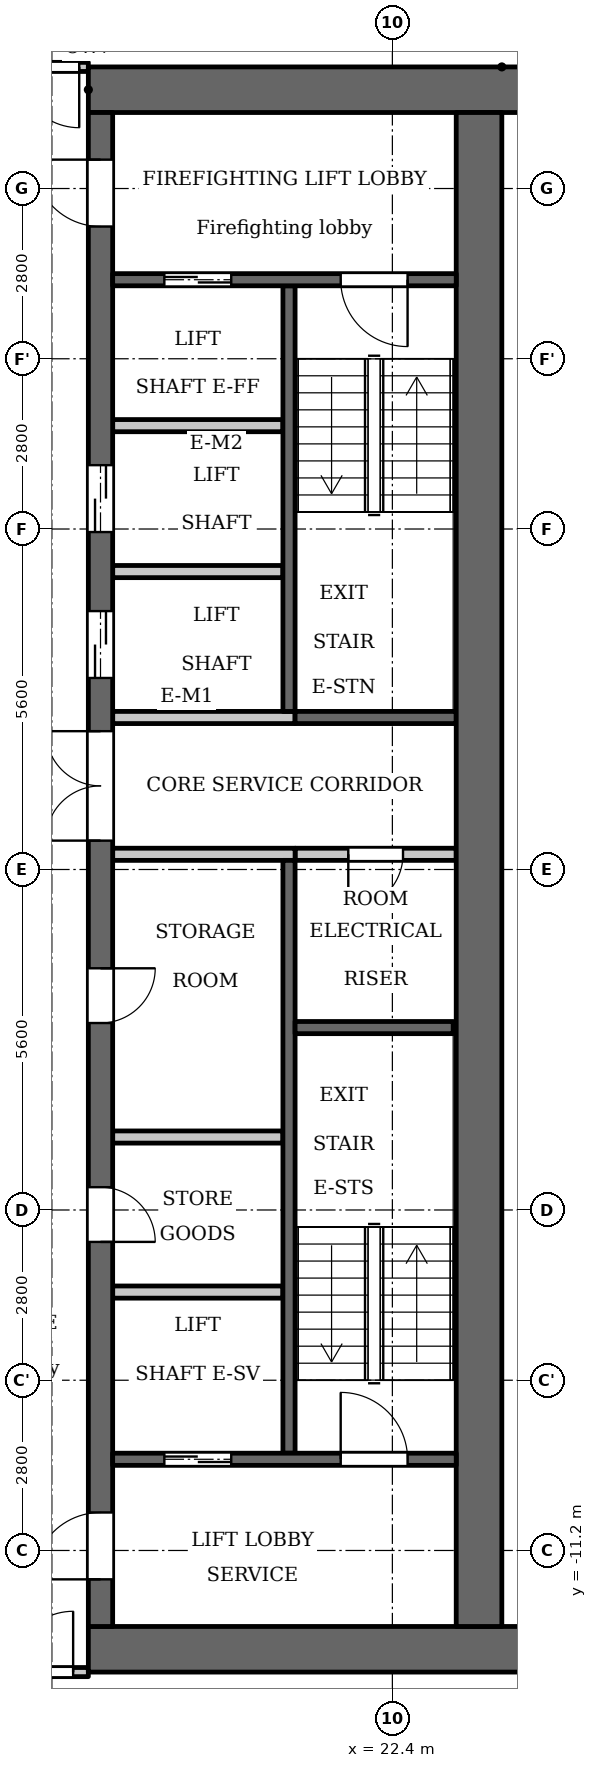
"""IFC4 building model, lengths in metres.
Left out: names, types, materials, properties, quantities, classifications, styles, units other than length and angle.
Written with IfcOpenShell. Run it as: python <this file> out.ifc"""

import sys

from ifc_helpers import new_model, si_unit, direction, frame, frame_2d, origin, place, context, subcontext, project, spatial, rectangle, extrude, element, fill, save


model = new_model("IFC4")
c1 = context("Model", 3, precision=1e-05, world=origin(), true_north=direction((0.0, 1.0)))
c2 = subcontext(c1, "Body", "Model", "MODEL_VIEW")
j1 = project(units=[si_unit("LENGTHUNIT", "METRE"), si_unit("PLANEANGLEUNIT", "RADIAN")], contexts=[c1])
p1 = place(None, origin())
s1 = spatial("IfcSite", under=j1, at=p1, CompositionType="ELEMENT")
p2 = place(p1, origin())
s2 = spatial("IfcBuilding", under=s1, at=p2, CompositionType="ELEMENT")
p3 = place(p2, frame((0.0, 0.0, 188.9)))
s3 = spatial("IfcBuildingStorey", under=s2, at=p3, CompositionType="ELEMENT", Elevation=188.9)
p4 = place(p3, frame((20.7, 2.6, 0.0), z_axis=(0.0, 0.0, 1.0), x_axis=(0.0, 1.0, 0.0)))
e1 = element("IfcWall", 1, at=p4, inside=s3, PredefinedType="SHEAR", context=c2, shape_type="SweptSolid", body=[
    extrude(rectangle(XDim=7.0, YDim=0.2, at=frame_2d((3.5, 0.0))), origin(), (0.0, 0.0, 1.0), 3.2),
])
p5 = place(p3, frame((20.7, -9.6, 0.0), z_axis=(0.0, 0.0, 1.0), x_axis=(0.0, 1.0, 0.0)))
e2 = element("IfcWall", 2, at=p5, inside=s3, PredefinedType="SHEAR", context=c2, shape_type="SweptSolid", body=[
    extrude(rectangle(XDim=9.75, YDim=0.2, at=frame_2d((4.875, 0.0))), origin(), (0.0, 0.0, 1.0), 3.2),
])
p6 = place(p3, frame((20.8, 2.5, 0.0), z_axis=(0.0, 0.0, 1.0), x_axis=(1.0, 0.0, 0.0)))
e3 = element("IfcWall", 3, at=p6, inside=s3, PredefinedType="SHEAR", context=c2, shape_type="SweptSolid", body=[
    extrude(rectangle(XDim=2.65, YDim=0.2, at=frame_2d((1.325, 0.0))), origin(), (0.0, 0.0, 1.0), 3.2),
])
p7 = place(p3, frame((20.8, 0.25, 0.0), z_axis=(0.0, 0.0, 1.0), x_axis=(1.0, 0.0, 0.0)))
e4 = element("IfcWall", 4, at=p7, inside=s3, PredefinedType="PARTITIONING", context=c2, shape_type="SweptSolid", body=[
    extrude(rectangle(XDim=2.65, YDim=0.2, at=frame_2d((1.325, 0.0))), origin(), (0.0, 0.0, 1.0), 3.2),
])
p8 = place(p7, frame((0.875, 0.0, 0.0)))
e5 = element("IfcOpeningElement", 5, at=p8, cuts=e4, PredefinedType="OPENING", context=c2, shape_type="SweptSolid", body=[
    extrude(rectangle(XDim=0.9, YDim=2.1, at=frame_2d((0.45, 1.05))), frame((0.0, 0.11, 0.0), z_axis=(0.0, -1.0, 0.0), x_axis=(1.0, 0.0, 0.0)), (0.0, 0.0, 1.0), 0.22),
])
for number, where, z_axis, x_axis in (
    (6, (17.4, 12.825, 0.0), (0.0, 0.0, 1.0), (1.0, 0.0, 0.0)),
    (7, (17.4, -12.825, 0.0), (0.0, 0.0, 1.0), (1.0, 0.0, 0.0)),
):
    element("IfcWall", number, at=place(p3, frame(where, z_axis=z_axis, x_axis=x_axis)), inside=s3, PredefinedType="SHEAR", context=c2, shape_type="SweptSolid", body=[
        extrude(rectangle(XDim=7.6, YDim=0.75, at=frame_2d((3.8, 0.0))), origin(), (0.0, 0.0, 1.0), 3.2),
    ])
p9 = place(p3, frame((17.8, -4.4, 0.0), z_axis=(0.0, 0.0, 1.0), x_axis=(1.0, 0.0, 0.0)))
e8 = element("IfcWall", 8, at=p9, inside=s3, PredefinedType="PARTITIONING", context=c2, shape_type="SweptSolid", body=[
    extrude(rectangle(XDim=2.8, YDim=0.2, at=frame_2d((1.4, 0.0))), origin(), (0.0, 0.0, 1.0), 3.2),
])
p10 = place(p3, frame((17.6, -12.45, 0.0), z_axis=(0.0, 0.0, 1.0), x_axis=(0.0, 1.0, 0.0)))
e9 = element("IfcWall", 9, at=p10, inside=s3, PredefinedType="SHEAR", context=c2, shape_type="SweptSolid", body=[
    extrude(rectangle(XDim=24.9, YDim=0.4, at=frame_2d((12.45, 0.0))), origin(), (0.0, 0.0, 1.0), 3.2),
])
p11 = place(p10, frame((6.325, 0.0, 0.0)))
e10 = element("IfcOpeningElement", 10, at=p11, cuts=e9, PredefinedType="OPENING", context=c2, shape_type="SweptSolid", body=[
    extrude(rectangle(XDim=0.9, YDim=2.1, at=frame_2d((0.45, 1.05))), frame((0.0, 0.21, 0.0), z_axis=(0.0, -1.0, 0.0), x_axis=(1.0, 0.0, 0.0)), (0.0, 0.0, 1.0), 0.42),
])
p12 = place(p10, frame((9.925, 0.0, 0.0)))
e11 = element("IfcOpeningElement", 11, at=p12, cuts=e9, PredefinedType="OPENING", context=c2, shape_type="SweptSolid", body=[
    extrude(rectangle(XDim=0.9, YDim=2.1, at=frame_2d((0.45, 1.05))), frame((0.0, 0.21, 0.0), z_axis=(0.0, -1.0, 0.0), x_axis=(1.0, 0.0, 0.0)), (0.0, 0.0, 1.0), 0.42),
])
p13 = place(p10, frame((15.6, 0.0, 0.0)))
e12 = element("IfcOpeningElement", 12, at=p13, cuts=e9, PredefinedType="OPENING", context=c2, shape_type="SweptSolid", body=[
    extrude(rectangle(XDim=1.1, YDim=2.1, at=frame_2d((0.55, 1.05))), frame((0.0, 0.21, 0.0), z_axis=(0.0, -1.0, 0.0), x_axis=(1.0, 0.0, 0.0)), (0.0, 0.0, 1.0), 0.42),
])
p14 = place(p10, frame((18.0, 0.0, 0.0)))
e13 = element("IfcOpeningElement", 13, at=p14, cuts=e9, PredefinedType="OPENING", context=c2, shape_type="SweptSolid", body=[
    extrude(rectangle(XDim=1.1, YDim=2.1, at=frame_2d((0.55, 1.05))), frame((0.0, 0.21, 0.0), z_axis=(0.0, -1.0, 0.0), x_axis=(1.0, 0.0, 0.0)), (0.0, 0.0, 1.0), 0.42),
])
p15 = place(p10, frame((23.025, 0.0, 0.0)))
e14 = element("IfcOpeningElement", 14, at=p15, cuts=e9, PredefinedType="OPENING", context=c2, shape_type="SweptSolid", body=[
    extrude(rectangle(XDim=1.1, YDim=2.1, at=frame_2d((0.55, 1.05))), frame((0.0, 0.21, 0.0), z_axis=(0.0, -1.0, 0.0), x_axis=(1.0, 0.0, 0.0)), (0.0, 0.0, 1.0), 0.42),
])
p16 = place(p10, frame((0.775, 0.0, 0.0)))
e15 = element("IfcOpeningElement", 15, at=p16, cuts=e9, PredefinedType="OPENING", context=c2, shape_type="SweptSolid", body=[
    extrude(rectangle(XDim=1.1, YDim=2.1, at=frame_2d((0.55, 1.05))), frame((0.0, 0.21, 0.0), z_axis=(0.0, -1.0, 0.0), x_axis=(1.0, 0.0, 0.0)), (0.0, 0.0, 1.0), 0.42),
])
p17 = place(p10, frame((12.925, 0.0, 0.0)))
e16 = element("IfcOpeningElement", 16, at=p17, cuts=e9, PredefinedType="OPENING", context=c2, shape_type="SweptSolid", body=[
    extrude(rectangle(XDim=1.8, YDim=2.1, at=frame_2d((0.9, 1.05))), frame((0.0, 0.21, 0.0), z_axis=(0.0, -1.0, 0.0), x_axis=(1.0, 0.0, 0.0)), (0.0, 0.0, 1.0), 0.42),
])
p18 = place(p3, frame((23.825, -12.45, 0.0), z_axis=(0.0, 0.0, 1.0), x_axis=(0.0, 1.0, 0.0)))
e17 = element("IfcWall", 17, at=p18, inside=s3, PredefinedType="SHEAR", context=c2, shape_type="SweptSolid", body=[
    extrude(rectangle(XDim=24.9, YDim=0.75, at=frame_2d((12.45, 0.0))), origin(), (0.0, 0.0, 1.0), 3.2),
])
p19 = place(p3, frame((17.8, -9.7, 0.0), z_axis=(0.0, 0.0, 1.0), x_axis=(1.0, 0.0, 0.0)))
e18 = element("IfcWall", 18, at=p19, inside=s3, PredefinedType="SHEAR", context=c2, shape_type="SweptSolid", body=[
    extrude(rectangle(XDim=5.65, YDim=0.2, at=frame_2d((2.825, 0.0))), origin(), (0.0, 0.0, 1.0), 3.2),
])
p20 = place(p19, frame((0.85, 0.0, 0.0)))
e19 = element("IfcOpeningElement", 19, at=p20, cuts=e18, PredefinedType="OPENING", context=c2, shape_type="SweptSolid", body=[
    extrude(rectangle(XDim=1.1, YDim=2.1, at=frame_2d((0.55, 1.05))), frame((0.0, 0.11, 0.0), z_axis=(0.0, -1.0, 0.0), x_axis=(1.0, 0.0, 0.0)), (0.0, 0.0, 1.0), 0.22),
])
p21 = place(p19, frame((3.75, 0.0, 0.0)))
e20 = element("IfcOpeningElement", 20, at=p21, cuts=e18, PredefinedType="OPENING", context=c2, shape_type="SweptSolid", body=[
    extrude(rectangle(XDim=1.1, YDim=2.1, at=frame_2d((0.55, 1.05))), frame((0.0, 0.11, 0.0), z_axis=(0.0, -1.0, 0.0), x_axis=(1.0, 0.0, 0.0)), (0.0, 0.0, 1.0), 0.22),
])
p22 = place(p3, frame((17.8, -6.95, 0.0), z_axis=(0.0, 0.0, 1.0), x_axis=(1.0, 0.0, 0.0)))
e21 = element("IfcWall", 21, at=p22, inside=s3, PredefinedType="PARTITIONING", context=c2, shape_type="SweptSolid", body=[
    extrude(rectangle(XDim=2.8, YDim=0.2, at=frame_2d((1.4, 0.0))), origin(), (0.0, 0.0, 1.0), 3.2),
])
for number, where, z_axis, x_axis in (
    (22, (17.8, 0.25, 0.0), (0.0, 0.0, 1.0), (1.0, 0.0, 0.0)),
    (23, (17.8, 2.5, 0.0), (0.0, 0.0, 1.0), (1.0, 0.0, 0.0)),
):
    element("IfcWall", number, at=place(p3, frame(where, z_axis=z_axis, x_axis=x_axis)), inside=s3, PredefinedType="PARTITIONING", context=c2, shape_type="SweptSolid", body=[
        extrude(rectangle(XDim=3.0, YDim=0.2, at=frame_2d((1.5, 0.0))), origin(), (0.0, 0.0, 1.0), 3.2),
    ])
for number, where, z_axis, x_axis in (
    (24, (17.8, 4.9, 0.0), (0.0, 0.0, 1.0), (1.0, 0.0, 0.0)),
    (25, (17.8, 7.3, 0.0), (0.0, 0.0, 1.0), (1.0, 0.0, 0.0)),
):
    element("IfcWall", number, at=place(p3, frame(where, z_axis=z_axis, x_axis=x_axis)), inside=s3, PredefinedType="PARTITIONING", context=c2, shape_type="SweptSolid", body=[
        extrude(rectangle(XDim=2.8, YDim=0.2, at=frame_2d((1.4, 0.0))), origin(), (0.0, 0.0, 1.0), 3.2),
    ])
p23 = place(p3, frame((17.8, 9.7, 0.0), z_axis=(0.0, 0.0, 1.0), x_axis=(1.0, 0.0, 0.0)))
e26 = element("IfcWall", 26, at=p23, inside=s3, PredefinedType="SHEAR", context=c2, shape_type="SweptSolid", body=[
    extrude(rectangle(XDim=5.65, YDim=0.2, at=frame_2d((2.825, 0.0))), origin(), (0.0, 0.0, 1.0), 3.2),
])
p24 = place(p23, frame((0.85, 0.0, 0.0)))
e27 = element("IfcOpeningElement", 27, at=p24, cuts=e26, PredefinedType="OPENING", context=c2, shape_type="SweptSolid", body=[
    extrude(rectangle(XDim=1.1, YDim=2.1, at=frame_2d((0.55, 1.05))), frame((0.0, 0.11, 0.0), z_axis=(0.0, -1.0, 0.0), x_axis=(1.0, 0.0, 0.0)), (0.0, 0.0, 1.0), 0.22),
])
p25 = place(p23, frame((3.75, 0.0, 0.0)))
e28 = element("IfcOpeningElement", 28, at=p25, cuts=e26, PredefinedType="OPENING", context=c2, shape_type="SweptSolid", body=[
    extrude(rectangle(XDim=1.1, YDim=2.1, at=frame_2d((0.55, 1.05))), frame((0.0, 0.11, 0.0), z_axis=(0.0, -1.0, 0.0), x_axis=(1.0, 0.0, 0.0)), (0.0, 0.0, 1.0), 0.22),
])
p26 = place(p3, frame((20.8, -2.6, 0.0), z_axis=(0.0, 0.0, 1.0), x_axis=(1.0, 0.0, 0.0)))
e29 = element("IfcWall", 29, at=p26, inside=s3, PredefinedType="SHEAR", context=c2, shape_type="SweptSolid", body=[
    extrude(rectangle(XDim=2.6, YDim=0.2, at=frame_2d((1.3, 0.0))), origin(), (0.0, 0.0, 1.0), 3.2),
])
p27 = place(p3, frame((-17.4, -13.2, 0.0), z_axis=(0.0, 0.0, 1.0), x_axis=(1.0, 0.0, 0.0)))
e30 = element("IfcWall", 30, at=p27, inside=s3, PredefinedType="PARTITIONING", context=c2, shape_type="SweptSolid", body=[
    extrude(rectangle(XDim=34.8, YDim=0.15, at=frame_2d((17.4, 0.0))), origin(), (0.0, 0.0, 1.0), 3.2),
])
p28 = place(p27, frame((0.15, 0.0, 0.0)))
e31 = element("IfcOpeningElement", 31, at=p28, cuts=e30, PredefinedType="OPENING", context=c2, shape_type="SweptSolid", body=[
    extrude(rectangle(XDim=1.0, YDim=2.1, at=frame_2d((0.5, 1.05))), frame((0.0, 0.085, 0.0), z_axis=(0.0, -1.0, 0.0), x_axis=(1.0, 0.0, 0.0)), (0.0, 0.0, 1.0), 0.17),
])
p29 = place(p27, frame((33.55, 0.0, 0.0)))
e32 = element("IfcOpeningElement", 32, at=p29, cuts=e30, PredefinedType="OPENING", context=c2, shape_type="SweptSolid", body=[
    extrude(rectangle(XDim=1.0, YDim=2.1, at=frame_2d((0.5, 1.05))), frame((0.0, 0.085, 0.0), z_axis=(0.0, -1.0, 0.0), x_axis=(1.0, 0.0, 0.0)), (0.0, 0.0, 1.0), 0.17),
])
p30 = place(p27, frame((15.7, 0.0, 0.0)))
e33 = element("IfcOpeningElement", 33, at=p30, cuts=e30, PredefinedType="OPENING", context=c2, shape_type="SweptSolid", body=[
    extrude(rectangle(XDim=1.0, YDim=2.1, at=frame_2d((0.5, 1.05))), frame((0.0, 0.085, 0.0), z_axis=(0.0, -1.0, 0.0), x_axis=(1.0, 0.0, 0.0)), (0.0, 0.0, 1.0), 0.17),
])
p31 = place(p27, frame((26.9, 0.0, 0.0)))
e34 = element("IfcOpeningElement", 34, at=p31, cuts=e30, PredefinedType="OPENING", context=c2, shape_type="SweptSolid", body=[
    extrude(rectangle(XDim=1.0, YDim=2.1, at=frame_2d((0.5, 1.05))), frame((0.0, 0.085, 0.0), z_axis=(0.0, -1.0, 0.0), x_axis=(1.0, 0.0, 0.0)), (0.0, 0.0, 1.0), 0.17),
])
p32 = place(p3, frame((-17.4, 13.2, 0.0), z_axis=(0.0, 0.0, 1.0), x_axis=(1.0, 0.0, 0.0)))
e35 = element("IfcWall", 35, at=p32, inside=s3, PredefinedType="PARTITIONING", context=c2, shape_type="SweptSolid", body=[
    extrude(rectangle(XDim=34.8, YDim=0.15, at=frame_2d((17.4, 0.0))), origin(), (0.0, 0.0, 1.0), 3.2),
])
p33 = place(p32, frame((0.25, 0.0, 0.0)))
e36 = element("IfcOpeningElement", 36, at=p33, cuts=e35, PredefinedType="OPENING", context=c2, shape_type="SweptSolid", body=[
    extrude(rectangle(XDim=1.0, YDim=2.1, at=frame_2d((0.5, 1.05))), frame((0.0, 0.085, 0.0), z_axis=(0.0, -1.0, 0.0), x_axis=(1.0, 0.0, 0.0)), (0.0, 0.0, 1.0), 0.17),
])
p34 = place(p32, frame((33.65, 0.0, 0.0)))
e37 = element("IfcOpeningElement", 37, at=p34, cuts=e35, PredefinedType="OPENING", context=c2, shape_type="SweptSolid", body=[
    extrude(rectangle(XDim=1.0, YDim=2.1, at=frame_2d((0.5, 1.05))), frame((0.0, 0.085, 0.0), z_axis=(0.0, -1.0, 0.0), x_axis=(1.0, 0.0, 0.0)), (0.0, 0.0, 1.0), 0.17),
])
p35 = place(p32, frame((10.15, 0.0, 0.0)))
e38 = element("IfcOpeningElement", 38, at=p35, cuts=e35, PredefinedType="OPENING", context=c2, shape_type="SweptSolid", body=[
    extrude(rectangle(XDim=1.0, YDim=2.1, at=frame_2d((0.5, 1.05))), frame((0.0, 0.085, 0.0), z_axis=(0.0, -1.0, 0.0), x_axis=(1.0, 0.0, 0.0)), (0.0, 0.0, 1.0), 0.17),
])
p36 = place(p32, frame((13.55, 0.0, 0.0)))
e39 = element("IfcOpeningElement", 39, at=p36, cuts=e35, PredefinedType="OPENING", context=c2, shape_type="SweptSolid", body=[
    extrude(rectangle(XDim=1.0, YDim=2.1, at=frame_2d((0.5, 1.05))), frame((0.0, 0.085, 0.0), z_axis=(0.0, -1.0, 0.0), x_axis=(1.0, 0.0, 0.0)), (0.0, 0.0, 1.0), 0.17),
])
p37 = place(p32, frame((20.85, 0.0, 0.0)))
e40 = element("IfcOpeningElement", 40, at=p37, cuts=e35, PredefinedType="OPENING", context=c2, shape_type="SweptSolid", body=[
    extrude(rectangle(XDim=1.0, YDim=2.1, at=frame_2d((0.5, 1.05))), frame((0.0, 0.085, 0.0), z_axis=(0.0, -1.0, 0.0), x_axis=(1.0, 0.0, 0.0)), (0.0, 0.0, 1.0), 0.17),
])
p38 = place(p32, frame((23.7, 0.0, 0.0)))
e41 = element("IfcOpeningElement", 41, at=p38, cuts=e35, PredefinedType="OPENING", context=c2, shape_type="SweptSolid", body=[
    extrude(rectangle(XDim=1.0, YDim=2.1, at=frame_2d((0.5, 1.05))), frame((0.0, 0.085, 0.0), z_axis=(0.0, -1.0, 0.0), x_axis=(1.0, 0.0, 0.0)), (0.0, 0.0, 1.0), 0.17),
])
p39 = place(p20, origin())
e42 = element("IfcDoor", 42, at=p39, inside=s3, OperationType="DOUBLE_DOOR_SLIDING", PredefinedType="DOOR", context=c2, shape_type="SweptSolid", body=[
    extrude(rectangle(XDim=1.1, YDim=2.1, at=frame_2d((0.55, 1.05))), frame((0.0, 0.025, 0.0), z_axis=(0.0, -1.0, 0.0), x_axis=(1.0, 0.0, 0.0)), (0.0, 0.0, 1.0), 0.05),
])
fill(e19, e42)
p40 = place(p11, origin())
e43 = element("IfcDoor", 43, at=p40, inside=s3, OperationType="SINGLE_SWING_LEFT", PredefinedType="DOOR", context=c2, shape_type="SweptSolid", body=[
    extrude(rectangle(XDim=0.9, YDim=2.1, at=frame_2d((0.45, 1.05))), frame((0.0, 0.025, 0.0), z_axis=(0.0, -1.0, 0.0), x_axis=(1.0, 0.0, 0.0)), (0.0, 0.0, 1.0), 0.05),
])
fill(e10, e43)
p41 = place(p12, origin())
e44 = element("IfcDoor", 44, at=p41, inside=s3, OperationType="SINGLE_SWING_RIGHT", PredefinedType="DOOR", context=c2, shape_type="SweptSolid", body=[
    extrude(rectangle(XDim=0.9, YDim=2.1, at=frame_2d((0.45, 1.05))), frame((0.0, 0.025, 0.0), z_axis=(0.0, -1.0, 0.0), x_axis=(1.0, 0.0, 0.0)), (0.0, 0.0, 1.0), 0.05),
])
fill(e11, e44)
p42 = place(p13, origin())
e45 = element("IfcDoor", 45, at=p42, inside=s3, OperationType="DOUBLE_DOOR_SLIDING", PredefinedType="DOOR", context=c2, shape_type="SweptSolid", body=[
    extrude(rectangle(XDim=1.1, YDim=2.1, at=frame_2d((0.55, 1.05))), frame((0.0, 0.025, 0.0), z_axis=(0.0, -1.0, 0.0), x_axis=(1.0, 0.0, 0.0)), (0.0, 0.0, 1.0), 0.05),
])
fill(e12, e45)
p43 = place(p14, origin())
e46 = element("IfcDoor", 46, at=p43, inside=s3, OperationType="DOUBLE_DOOR_SLIDING", PredefinedType="DOOR", context=c2, shape_type="SweptSolid", body=[
    extrude(rectangle(XDim=1.1, YDim=2.1, at=frame_2d((0.55, 1.05))), frame((0.0, 0.025, 0.0), z_axis=(0.0, -1.0, 0.0), x_axis=(1.0, 0.0, 0.0)), (0.0, 0.0, 1.0), 0.05),
])
fill(e13, e46)
p44 = place(p24, origin())
e47 = element("IfcDoor", 47, at=p44, inside=s3, OperationType="DOUBLE_DOOR_SLIDING", PredefinedType="DOOR", context=c2, shape_type="SweptSolid", body=[
    extrude(rectangle(XDim=1.1, YDim=2.1, at=frame_2d((0.55, 1.05))), frame((0.0, 0.025, 0.0), z_axis=(0.0, -1.0, 0.0), x_axis=(1.0, 0.0, 0.0)), (0.0, 0.0, 1.0), 0.05),
])
fill(e27, e47)
p45 = place(p15, origin())
e48 = element("IfcDoor", 48, at=p45, inside=s3, OperationType="SINGLE_SWING_LEFT", PredefinedType="DOOR", context=c2, shape_type="SweptSolid", body=[
    extrude(rectangle(XDim=1.1, YDim=2.1, at=frame_2d((0.55, 1.05))), frame((0.0, 0.025, 0.0), z_axis=(0.0, -1.0, 0.0), x_axis=(1.0, 0.0, 0.0)), (0.0, 0.0, 1.0), 0.05),
])
fill(e14, e48)
p46 = place(p16, origin())
e49 = element("IfcDoor", 49, at=p46, inside=s3, OperationType="SINGLE_SWING_RIGHT", PredefinedType="DOOR", context=c2, shape_type="SweptSolid", body=[
    extrude(rectangle(XDim=1.1, YDim=2.1, at=frame_2d((0.55, 1.05))), frame((0.0, 0.025, 0.0), z_axis=(0.0, -1.0, 0.0), x_axis=(1.0, 0.0, 0.0)), (0.0, 0.0, 1.0), 0.05),
])
fill(e15, e49)
p47 = place(p25, origin())
e50 = element("IfcDoor", 50, at=p47, inside=s3, OperationType="SINGLE_SWING_RIGHT", PredefinedType="DOOR", context=c2, shape_type="SweptSolid", body=[
    extrude(rectangle(XDim=1.1, YDim=2.1, at=frame_2d((0.55, 1.05))), frame((0.0, 0.025, 0.0), z_axis=(0.0, -1.0, 0.0), x_axis=(1.0, 0.0, 0.0)), (0.0, 0.0, 1.0), 0.05),
])
fill(e28, e50)
p48 = place(p21, origin())
e51 = element("IfcDoor", 51, at=p48, inside=s3, OperationType="SINGLE_SWING_RIGHT", PredefinedType="DOOR", context=c2, shape_type="SweptSolid", body=[
    extrude(rectangle(XDim=1.1, YDim=2.1, at=frame_2d((0.55, 1.05))), frame((0.0, 0.025, 0.0), z_axis=(0.0, -1.0, 0.0), x_axis=(1.0, 0.0, 0.0)), (0.0, 0.0, 1.0), 0.05),
])
fill(e20, e51)
p49 = place(p17, origin())
e52 = element("IfcDoor", 52, at=p49, inside=s3, OperationType="DOUBLE_DOOR_SINGLE_SWING", PredefinedType="DOOR", context=c2, shape_type="SweptSolid", body=[
    extrude(rectangle(XDim=1.8, YDim=2.1, at=frame_2d((0.9, 1.05))), frame((0.0, 0.025, 0.0), z_axis=(0.0, -1.0, 0.0), x_axis=(1.0, 0.0, 0.0)), (0.0, 0.0, 1.0), 0.05),
])
fill(e16, e52)
p50 = place(p8, origin())
e53 = element("IfcDoor", 53, at=p50, inside=s3, OperationType="SINGLE_SWING_LEFT", PredefinedType="DOOR", context=c2, shape_type="SweptSolid", body=[
    extrude(rectangle(XDim=0.9, YDim=2.1, at=frame_2d((0.45, 1.05))), frame((0.0, 0.025, 0.0), z_axis=(0.0, -1.0, 0.0), x_axis=(1.0, 0.0, 0.0)), (0.0, 0.0, 1.0), 0.05),
])
fill(e5, e53)
p51 = place(p34, origin())
e54 = element("IfcDoor", 54, at=p51, inside=s3, OperationType="SINGLE_SWING_RIGHT", PredefinedType="DOOR", context=c2, shape_type="SweptSolid", body=[
    extrude(rectangle(XDim=1.0, YDim=2.1, at=frame_2d((0.5, 1.05))), frame((0.0, 0.025, 0.0), z_axis=(0.0, -1.0, 0.0), x_axis=(1.0, 0.0, 0.0)), (0.0, 0.0, 1.0), 0.05),
])
fill(e37, e54)
p52 = place(p29, origin())
e55 = element("IfcDoor", 55, at=p52, inside=s3, OperationType="SINGLE_SWING_LEFT", PredefinedType="DOOR", context=c2, shape_type="SweptSolid", body=[
    extrude(rectangle(XDim=1.0, YDim=2.1, at=frame_2d((0.5, 1.05))), frame((0.0, 0.025, 0.0), z_axis=(0.0, -1.0, 0.0), x_axis=(1.0, 0.0, 0.0)), (0.0, 0.0, 1.0), 0.05),
])
fill(e32, e55)
save(model, sys.argv[1])
